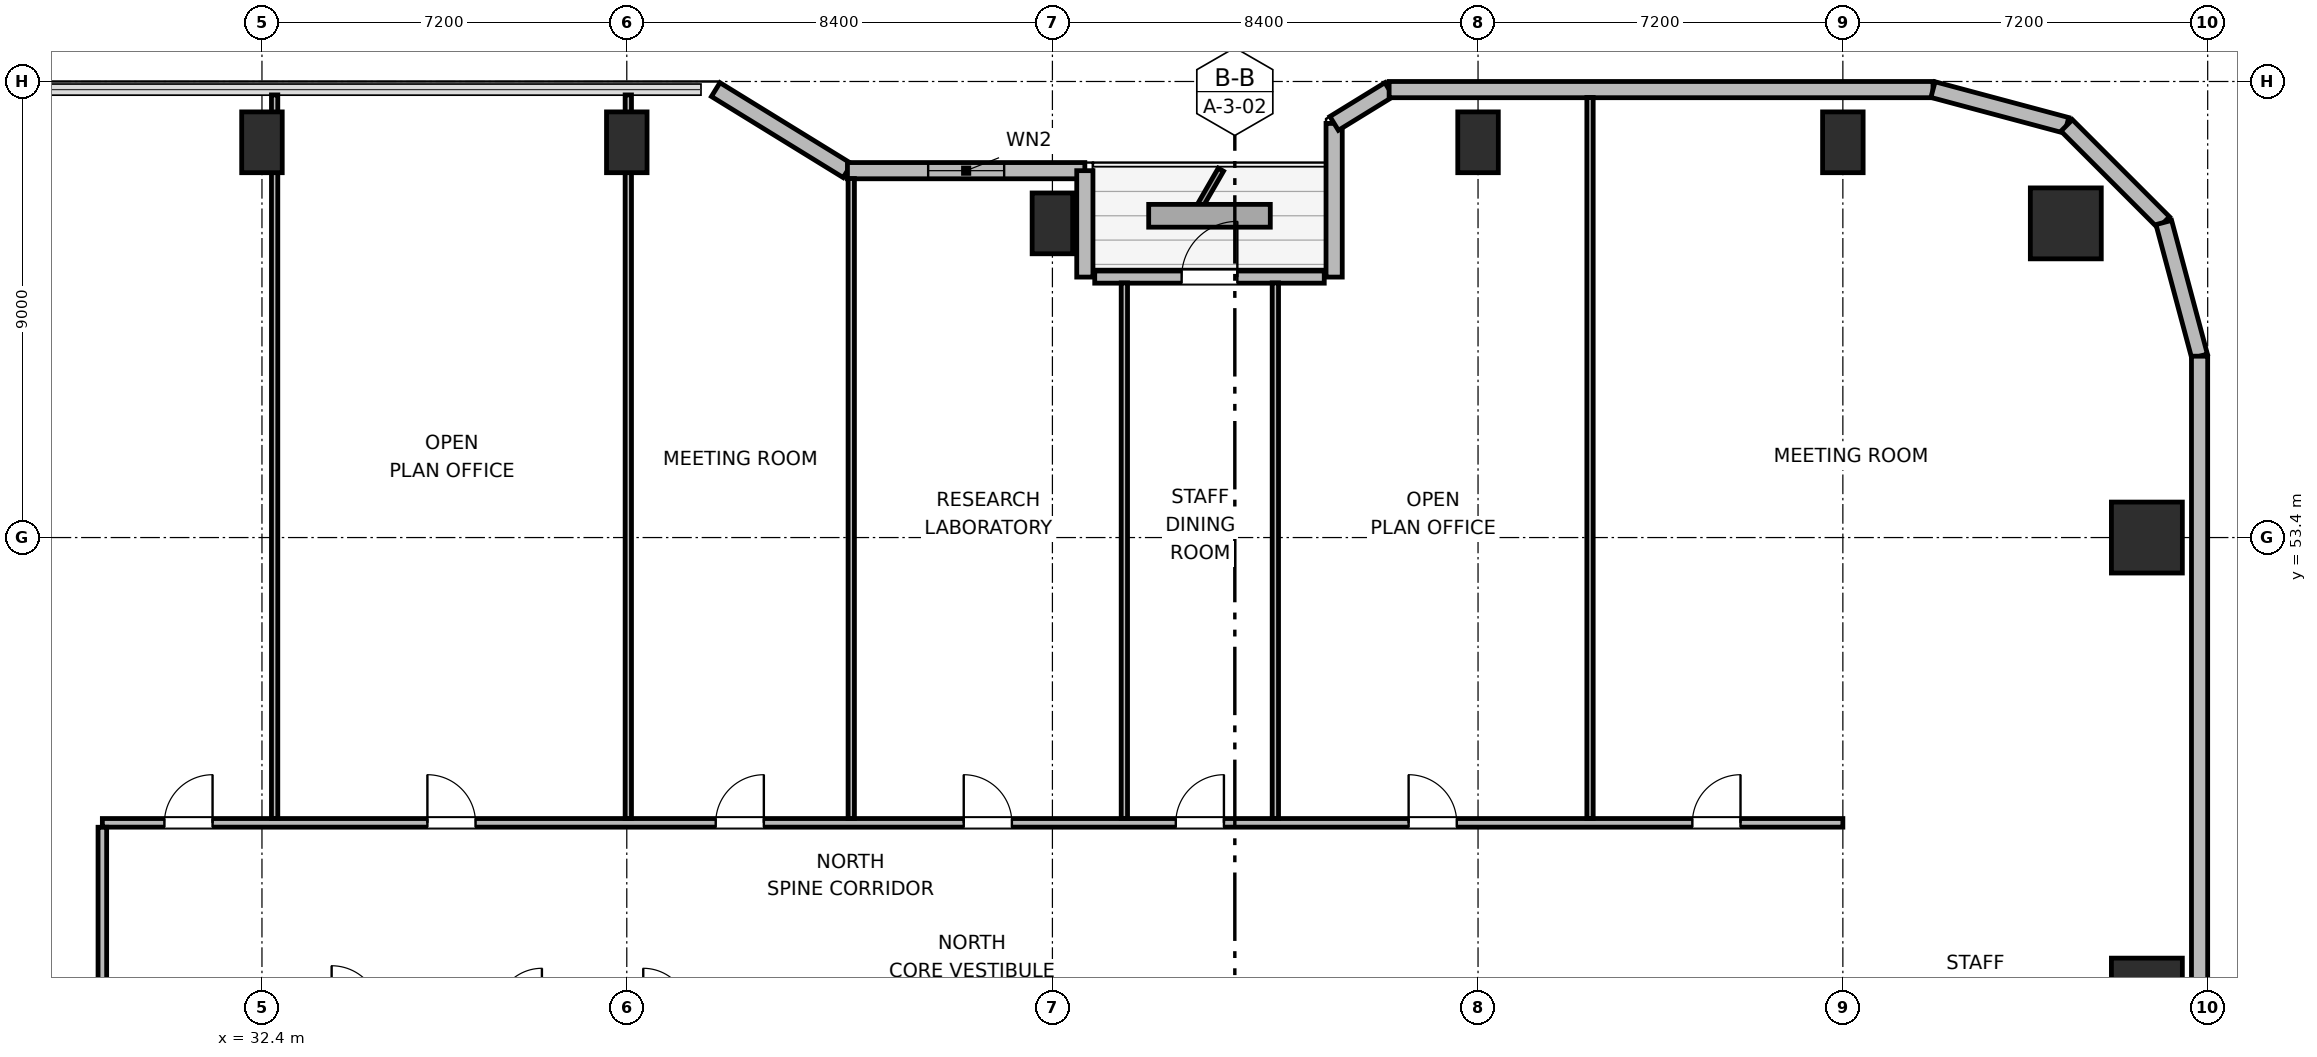
"""IFC4 building model, lengths in metres.
Left out: names, types, materials, properties, quantities, classifications, styles, units other than length and angle.
Written with IfcOpenShell. Run it as: python <this file> out.ifc"""

import sys

from ifc_helpers import new_model, si_unit, direction, frame, frame_2d, origin, origin_2d, place, context, subcontext, project, spatial, rectangle, circle, extrude, element, fill, save


model = new_model("IFC4")
c1 = context("Model", 3, precision=1e-05, world=origin(), true_north=direction((0.0, 1.0)))
c2 = subcontext(c1, "Body", "Model", "MODEL_VIEW")
j1 = project(units=[si_unit("LENGTHUNIT", "METRE"), si_unit("PLANEANGLEUNIT", "RADIAN")], contexts=[c1])
p1 = place(None, origin())
s1 = spatial("IfcSite", under=j1, at=p1, CompositionType="ELEMENT")
p2 = place(p1, origin())
s2 = spatial("IfcBuilding", under=s1, at=p2, CompositionType="ELEMENT")
p3 = place(p2, frame((0.0, 0.0, 120.9)))
s3 = spatial("IfcBuildingStorey", under=s2, at=p3, CompositionType="ELEMENT", Elevation=120.9)
p4 = place(p3, frame((68.0, 59.6, 0.0), z_axis=(0.0, 0.0, 1.0), x_axis=(1.0, 0.0, 0.0)))
e1 = element("IfcColumn", 1, at=p4, inside=s3, PredefinedType="COLUMN", context=c2, shape_type="SweptSolid", body=[
    extrude(circle(Radius=0.7, at=origin_2d()), origin(), (0.0, 0.0, 1.0), 4.5),
])
for number, where, z_axis, x_axis in (
    (2, (32.4, 61.2, 0.0), (0.0, 0.0, 1.0), (1.0, 0.0, 0.0)),
    (3, (39.6, 61.2, 0.0), (0.0, 0.0, 1.0), (1.0, 0.0, 0.0)),
    (4, (48.0, 59.6, 0.0), (0.0, 0.0, 1.0), (1.0, 0.0, 0.0)),
    (5, (56.4, 61.2, 0.0), (0.0, 0.0, 1.0), (1.0, 0.0, 0.0)),
    (6, (63.6, 61.2, 0.0), (0.0, 0.0, 1.0), (1.0, 0.0, 0.0)),
):
    element("IfcColumn", number, at=place(p3, frame(where, z_axis=z_axis, x_axis=x_axis)), inside=s3, PredefinedType="COLUMN", context=c2, shape_type="SweptSolid", body=[
        extrude(rectangle(XDim=0.8, YDim=1.2, at=origin_2d()), origin(), (0.0, 0.0, 1.0), 4.5),
    ])
for number, where, z_axis, x_axis in (
    (7, (69.6, 44.4, 0.0), (0.0, 0.0, 1.0), (1.0, 0.0, 0.0)),
    (8, (69.6, 53.4, 0.0), (0.0, 0.0, 1.0), (1.0, 0.0, 0.0)),
):
    element("IfcColumn", number, at=place(p3, frame(where, z_axis=z_axis, x_axis=x_axis)), inside=s3, PredefinedType="COLUMN", context=c2, shape_type="SweptSolid", body=[
        extrude(rectangle(XDim=1.4, YDim=1.4, at=origin_2d()), origin(), (0.0, 0.0, 1.0), 4.5),
    ])
p5 = place(p3, frame((41.355, 62.24, 0.0), z_axis=(0.0, 0.0, 1.0), x_axis=(0.851630857047, -0.524142044989, 0.0)))
e9 = element("IfcWall", 9, at=p5, inside=s3, PredefinedType="SOLIDWALL", context=c2, shape_type="SweptSolid", body=[
    extrude(rectangle(XDim=3.053, YDim=0.32, at=frame_2d((1.526, 0.0))), origin(), (0.0, 0.0, 1.0), 3.475),
])
p6 = place(p3, frame((43.955, 60.64, 0.0), z_axis=(0.0, 0.0, 1.0), x_axis=(1.0, 0.0, 0.0)))
e10 = element("IfcWall", 10, at=p6, inside=s3, PredefinedType="SOLIDWALL", context=c2, shape_type="SweptSolid", body=[
    extrude(rectangle(XDim=4.685, YDim=0.32, at=frame_2d((2.343, 0.0))), origin(), (0.0, 0.0, 1.0), 3.475),
])
p7 = place(p6, frame((1.593, 0.0, 0.85)))
e11 = element("IfcOpeningElement", 11, at=p7, cuts=e10, PredefinedType="OPENING", context=c2, shape_type="SweptSolid", body=[
    extrude(rectangle(XDim=1.5, YDim=1.1, at=frame_2d((0.75, 0.55))), frame((0.0, 0.17, 0.0), z_axis=(0.0, -1.0, 0.0), x_axis=(1.0, 0.0, 0.0)), (0.0, 0.0, 1.0), 0.34),
])
p8 = place(p3, frame((48.64, 60.64, 0.0), z_axis=(0.0, 0.0, 1.0), x_axis=(0.0, -1.0, 0.0)))
e12 = element("IfcWall", 12, at=p8, inside=s3, PredefinedType="SOLIDWALL", context=c2, shape_type="SweptSolid", body=[
    extrude(rectangle(XDim=2.1, YDim=0.32, at=frame_2d((1.05, 0.0))), origin(), (0.0, 0.0, 1.0), 3.475),
])
p9 = place(p3, frame((48.835, 58.54, 0.0), z_axis=(0.0, 0.0, 1.0), x_axis=(1.0, 0.0, 0.0)))
e13 = element("IfcWall", 13, at=p9, inside=s3, PredefinedType="SOLIDWALL", context=c2, shape_type="SweptSolid", body=[
    extrude(rectangle(XDim=4.53, YDim=0.24, at=frame_2d((2.265, 0.0))), origin(), (0.0, 0.0, 1.0), 4.24),
])
p10 = place(p9, frame((1.715, 0.0, 0.0)))
e14 = element("IfcOpeningElement", 14, at=p10, cuts=e13, PredefinedType="OPENING", context=c2, shape_type="SweptSolid", body=[
    extrude(rectangle(XDim=1.1, YDim=2.04, at=frame_2d((0.55, 1.02))), frame((0.0, 0.13, 0.0), z_axis=(0.0, -1.0, 0.0), x_axis=(1.0, 0.0, 0.0)), (0.0, 0.0, 1.0), 0.26),
])
p11 = place(p3, frame((53.56, 58.54, 0.0), z_axis=(0.0, 0.0, 1.0), x_axis=(0.0, 1.0, 0.0)))
e15 = element("IfcWall", 15, at=p11, inside=s3, PredefinedType="SOLIDWALL", context=c2, shape_type="SweptSolid", body=[
    extrude(rectangle(XDim=3.032, YDim=0.32, at=frame_2d((1.516, 0.0))), origin(), (0.0, 0.0, 1.0), 3.475),
])
p12 = place(p3, frame((53.56, 61.573, 0.0), z_axis=(0.0, 0.0, 1.0), x_axis=(0.851776724646, 0.523904964045, 0.0)))
e16 = element("IfcWall", 16, at=p12, inside=s3, PredefinedType="SOLIDWALL", context=c2, shape_type="SweptSolid", body=[
    extrude(rectangle(XDim=1.274, YDim=0.32, at=frame_2d((0.637, 0.0))), origin(), (0.0, 0.0, 1.0), 4.24),
])
p13 = place(p3, frame((54.645, 62.24, 0.0), z_axis=(0.0, 0.0, 1.0), x_axis=(1.0, 0.0, 0.0)))
e17 = element("IfcWall", 17, at=p13, inside=s3, PredefinedType="SOLIDWALL", context=c2, shape_type="SweptSolid", body=[
    extrude(rectangle(XDim=10.734, YDim=0.32, at=frame_2d((5.367, 0.0))), origin(), (0.0, 0.0, 1.0), 4.24),
])
p14 = place(p3, frame((65.379, 62.24, 0.0), z_axis=(0.0, 0.0, 1.0), x_axis=(0.965958423373, -0.25869736047, 0.0)))
e18 = element("IfcWall", 18, at=p14, inside=s3, PredefinedType="SOLIDWALL", context=c2, shape_type="SweptSolid", body=[
    extrude(rectangle(XDim=2.731, YDim=0.32, at=frame_2d((1.366, 0.0))), origin(), (0.0, 0.0, 1.0), 4.24),
])
p15 = place(p3, frame((68.017, 61.533, 0.0), z_axis=(0.0, 0.0, 1.0), x_axis=(0.707151821269, -0.707061738235, 0.0)))
e19 = element("IfcWall", 19, at=p15, inside=s3, PredefinedType="SOLIDWALL", context=c2, shape_type="SweptSolid", body=[
    extrude(rectangle(XDim=2.71, YDim=0.32, at=frame_2d((1.355, 0.0))), origin(), (0.0, 0.0, 1.0), 4.24),
])
p16 = place(p3, frame((69.934, 59.617, 0.0), z_axis=(0.0, 0.0, 1.0), x_axis=(0.258613949072, -0.965980758269, 0.0)))
e20 = element("IfcWall", 20, at=p16, inside=s3, PredefinedType="SOLIDWALL", context=c2, shape_type="SweptSolid", body=[
    extrude(rectangle(XDim=2.731, YDim=0.32, at=frame_2d((1.366, 0.0))), origin(), (0.0, 0.0, 1.0), 4.24),
])
p17 = place(p3, frame((70.64, 56.979, 0.0), z_axis=(0.0, 0.0, 1.0), x_axis=(0.0, -1.0, 0.0)))
e21 = element("IfcWall", 21, at=p17, inside=s3, PredefinedType="SOLIDWALL", context=c2, shape_type="SweptSolid", body=[
    extrude(rectangle(XDim=14.219, YDim=0.32, at=frame_2d((7.109, 0.0))), origin(), (0.0, 0.0, 1.0), 4.24),
])
p18 = place(p3, frame((29.25, 47.77, 0.0), z_axis=(0.0, 0.0, 1.0), x_axis=(1.0, 0.0, 0.0)))
e22 = element("IfcWall", 22, at=p18, inside=s3, PredefinedType="PARTITIONING", context=c2, shape_type="SweptSolid", body=[
    extrude(rectangle(XDim=34.35, YDim=0.17, at=frame_2d((17.175, 0.0))), origin(), (0.0, 0.0, 1.0), 4.24),
])
p19 = place(p18, frame((1.225, 0.0, 0.0)))
e23 = element("IfcOpeningElement", 23, at=p19, cuts=e22, PredefinedType="OPENING", context=c2, shape_type="SweptSolid", body=[
    extrude(rectangle(XDim=0.95, YDim=2.04, at=frame_2d((0.475, 1.02))), frame((0.0, 0.095, 0.0), z_axis=(0.0, -1.0, 0.0), x_axis=(1.0, 0.0, 0.0)), (0.0, 0.0, 1.0), 0.19),
])
p20 = place(p18, frame((6.415, 0.0, 0.0)))
e24 = element("IfcOpeningElement", 24, at=p20, cuts=e22, PredefinedType="OPENING", context=c2, shape_type="SweptSolid", body=[
    extrude(rectangle(XDim=0.95, YDim=2.04, at=frame_2d((0.475, 1.02))), frame((0.0, 0.095, 0.0), z_axis=(0.0, -1.0, 0.0), x_axis=(1.0, 0.0, 0.0)), (0.0, 0.0, 1.0), 0.19),
])
p21 = place(p18, frame((12.105, 0.0, 0.0)))
e25 = element("IfcOpeningElement", 25, at=p21, cuts=e22, PredefinedType="OPENING", context=c2, shape_type="SweptSolid", body=[
    extrude(rectangle(XDim=0.95, YDim=2.04, at=frame_2d((0.475, 1.02))), frame((0.0, 0.095, 0.0), z_axis=(0.0, -1.0, 0.0), x_axis=(1.0, 0.0, 0.0)), (0.0, 0.0, 1.0), 0.19),
])
p22 = place(p18, frame((17.0, 0.0, 0.0)))
e26 = element("IfcOpeningElement", 26, at=p22, cuts=e22, PredefinedType="OPENING", context=c2, shape_type="SweptSolid", body=[
    extrude(rectangle(XDim=0.95, YDim=2.04, at=frame_2d((0.475, 1.02))), frame((0.0, 0.095, 0.0), z_axis=(0.0, -1.0, 0.0), x_axis=(1.0, 0.0, 0.0)), (0.0, 0.0, 1.0), 0.19),
])
p23 = place(p18, frame((21.185, 0.0, 0.0)))
e27 = element("IfcOpeningElement", 27, at=p23, cuts=e22, PredefinedType="OPENING", context=c2, shape_type="SweptSolid", body=[
    extrude(rectangle(XDim=0.95, YDim=2.04, at=frame_2d((0.475, 1.02))), frame((0.0, 0.095, 0.0), z_axis=(0.0, -1.0, 0.0), x_axis=(1.0, 0.0, 0.0)), (0.0, 0.0, 1.0), 0.19),
])
p24 = place(p18, frame((25.78, 0.0, 0.0)))
e28 = element("IfcOpeningElement", 28, at=p24, cuts=e22, PredefinedType="OPENING", context=c2, shape_type="SweptSolid", body=[
    extrude(rectangle(XDim=0.95, YDim=2.04, at=frame_2d((0.475, 1.02))), frame((0.0, 0.095, 0.0), z_axis=(0.0, -1.0, 0.0), x_axis=(1.0, 0.0, 0.0)), (0.0, 0.0, 1.0), 0.19),
])
p25 = place(p18, frame((31.38, 0.0, 0.0)))
e29 = element("IfcOpeningElement", 29, at=p25, cuts=e22, PredefinedType="OPENING", context=c2, shape_type="SweptSolid", body=[
    extrude(rectangle(XDim=0.95, YDim=2.04, at=frame_2d((0.475, 1.02))), frame((0.0, 0.095, 0.0), z_axis=(0.0, -1.0, 0.0), x_axis=(1.0, 0.0, 0.0)), (0.0, 0.0, 1.0), 0.19),
])
p26 = place(p3, frame((29.25, 37.1, 0.0), z_axis=(0.0, 0.0, 1.0), x_axis=(0.0, 1.0, 0.0)))
e30 = element("IfcWall", 30, at=p26, inside=s3, PredefinedType="PARTITIONING", context=c2, shape_type="SweptSolid", body=[
    extrude(rectangle(XDim=10.583, YDim=0.17, at=frame_2d((5.292, 0.0))), origin(), (0.0, 0.0, 1.0), 4.24),
])
p27 = place(p26, frame((4.86, 0.0, 0.0)))
e31 = element("IfcOpeningElement", 31, at=p27, cuts=e30, PredefinedType="OPENING", context=c2, shape_type="SweptSolid", body=[
    extrude(rectangle(XDim=0.95, YDim=2.04, at=frame_2d((0.475, 1.02))), frame((0.0, 0.095, 0.0), z_axis=(0.0, -1.0, 0.0), x_axis=(1.0, 0.0, 0.0)), (0.0, 0.0, 1.0), 0.19),
])
for number, where, z_axis, x_axis in (
    (32, (32.65, 47.857, 0.0), (0.0, 0.0, 1.0), (0.0, 1.0, 0.0)),
    (33, (39.63, 47.857, 0.0), (0.0, 0.0, 1.0), (0.0, 1.0, 0.0)),
):
    element("IfcWall", number, at=place(p3, frame(where, z_axis=z_axis, x_axis=x_axis)), inside=s3, PredefinedType="PARTITIONING", context=c2, shape_type="SweptSolid", body=[
        extrude(rectangle(XDim=14.278, YDim=0.125, at=frame_2d((7.139, 0.0))), origin(), (0.0, 0.0, 1.0), 3.603),
    ])
p28 = place(p3, frame((44.03, 47.857, 0.0), z_axis=(0.0, 0.0, 1.0), x_axis=(0.0, 1.0, 0.0)))
e34 = element("IfcWall", 34, at=p28, inside=s3, PredefinedType="PARTITIONING", context=c2, shape_type="SweptSolid", body=[
    extrude(rectangle(XDim=12.628, YDim=0.125, at=frame_2d((6.314, 0.0))), origin(), (0.0, 0.0, 1.0), 3.603),
])
p29 = place(p3, frame((49.42, 47.857, 0.0), z_axis=(0.0, 0.0, 1.0), x_axis=(0.0, 1.0, 0.0)))
e35 = element("IfcWall", 35, at=p29, inside=s3, PredefinedType="PARTITIONING", context=c2, shape_type="SweptSolid", body=[
    extrude(rectangle(XDim=10.568, YDim=0.125, at=frame_2d((5.284, 0.0))), origin(), (0.0, 0.0, 1.0), 4.24),
])
p30 = place(p3, frame((52.4, 47.857, 0.0), z_axis=(0.0, 0.0, 1.0), x_axis=(0.0, 1.0, 0.0)))
e36 = element("IfcWall", 36, at=p30, inside=s3, PredefinedType="PARTITIONING", context=c2, shape_type="SweptSolid", body=[
    extrude(rectangle(XDim=10.568, YDim=0.125, at=frame_2d((5.284, 0.0))), origin(), (0.0, 0.0, 1.0), 3.603),
])
p31 = place(p3, frame((58.61, 47.857, 0.0), z_axis=(0.0, 0.0, 1.0), x_axis=(0.0, 1.0, 0.0)))
e37 = element("IfcWall", 37, at=p31, inside=s3, PredefinedType="PARTITIONING", context=c2, shape_type="SweptSolid", body=[
    extrude(rectangle(XDim=14.228, YDim=0.125, at=frame_2d((7.114, 0.0))), origin(), (0.0, 0.0, 1.0), 4.24),
])
p32 = place(p7, origin())
e38 = element("IfcWindow", 38, at=p32, inside=s3, PartitioningType="SINGLE_PANEL", PredefinedType="WINDOW", context=c2, shape_type="SweptSolid", body=[
    extrude(rectangle(XDim=1.5, YDim=1.1, at=frame_2d((0.75, 0.55))), frame((0.0, 0.03, 0.0), z_axis=(0.0, -1.0, 0.0), x_axis=(1.0, 0.0, 0.0)), (0.0, 0.0, 1.0), 0.06),
])
fill(e11, e38)
p33 = place(p10, origin())
e39 = element("IfcDoor", 39, at=p33, inside=s3, OperationType="SINGLE_SWING_RIGHT", PredefinedType="DOOR", context=c2, shape_type="SweptSolid", body=[
    extrude(rectangle(XDim=1.1, YDim=2.04, at=frame_2d((0.55, 1.02))), frame((0.0, 0.025, 0.0), z_axis=(0.0, -1.0, 0.0), x_axis=(1.0, 0.0, 0.0)), (0.0, 0.0, 1.0), 0.05),
])
fill(e14, e39)
p34 = place(p19, origin())
e40 = element("IfcDoor", 40, at=p34, inside=s3, OperationType="SINGLE_SWING_RIGHT", PredefinedType="DOOR", context=c2, shape_type="SweptSolid", body=[
    extrude(rectangle(XDim=0.95, YDim=2.04, at=frame_2d((0.475, 1.02))), frame((0.0, 0.025, 0.0), z_axis=(0.0, -1.0, 0.0), x_axis=(1.0, 0.0, 0.0)), (0.0, 0.0, 1.0), 0.05),
])
fill(e23, e40)
p35 = place(p20, origin())
e41 = element("IfcDoor", 41, at=p35, inside=s3, OperationType="SINGLE_SWING_LEFT", PredefinedType="DOOR", context=c2, shape_type="SweptSolid", body=[
    extrude(rectangle(XDim=0.95, YDim=2.04, at=frame_2d((0.475, 1.02))), frame((0.0, 0.025, 0.0), z_axis=(0.0, -1.0, 0.0), x_axis=(1.0, 0.0, 0.0)), (0.0, 0.0, 1.0), 0.05),
])
fill(e24, e41)
p36 = place(p21, origin())
e42 = element("IfcDoor", 42, at=p36, inside=s3, OperationType="SINGLE_SWING_RIGHT", PredefinedType="DOOR", context=c2, shape_type="SweptSolid", body=[
    extrude(rectangle(XDim=0.95, YDim=2.04, at=frame_2d((0.475, 1.02))), frame((0.0, 0.025, 0.0), z_axis=(0.0, -1.0, 0.0), x_axis=(1.0, 0.0, 0.0)), (0.0, 0.0, 1.0), 0.05),
])
fill(e25, e42)
p37 = place(p22, origin())
e43 = element("IfcDoor", 43, at=p37, inside=s3, OperationType="SINGLE_SWING_LEFT", PredefinedType="DOOR", context=c2, shape_type="SweptSolid", body=[
    extrude(rectangle(XDim=0.95, YDim=2.04, at=frame_2d((0.475, 1.02))), frame((0.0, 0.025, 0.0), z_axis=(0.0, -1.0, 0.0), x_axis=(1.0, 0.0, 0.0)), (0.0, 0.0, 1.0), 0.05),
])
fill(e26, e43)
p38 = place(p23, origin())
e44 = element("IfcDoor", 44, at=p38, inside=s3, OperationType="SINGLE_SWING_RIGHT", PredefinedType="DOOR", context=c2, shape_type="SweptSolid", body=[
    extrude(rectangle(XDim=0.95, YDim=2.04, at=frame_2d((0.475, 1.02))), frame((0.0, 0.025, 0.0), z_axis=(0.0, -1.0, 0.0), x_axis=(1.0, 0.0, 0.0)), (0.0, 0.0, 1.0), 0.05),
])
fill(e27, e44)
p39 = place(p24, origin())
e45 = element("IfcDoor", 45, at=p39, inside=s3, OperationType="SINGLE_SWING_LEFT", PredefinedType="DOOR", context=c2, shape_type="SweptSolid", body=[
    extrude(rectangle(XDim=0.95, YDim=2.04, at=frame_2d((0.475, 1.02))), frame((0.0, 0.025, 0.0), z_axis=(0.0, -1.0, 0.0), x_axis=(1.0, 0.0, 0.0)), (0.0, 0.0, 1.0), 0.05),
])
fill(e28, e45)
p40 = place(p25, origin())
e46 = element("IfcDoor", 46, at=p40, inside=s3, OperationType="SINGLE_SWING_RIGHT", PredefinedType="DOOR", context=c2, shape_type="SweptSolid", body=[
    extrude(rectangle(XDim=0.95, YDim=2.04, at=frame_2d((0.475, 1.02))), frame((0.0, 0.025, 0.0), z_axis=(0.0, -1.0, 0.0), x_axis=(1.0, 0.0, 0.0)), (0.0, 0.0, 1.0), 0.05),
])
fill(e29, e46)
save(model, sys.argv[1])
